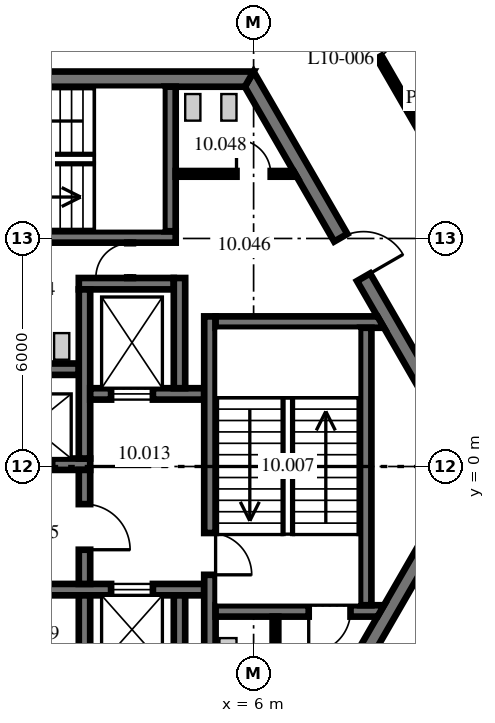
"""IFC4 building model, lengths in metres.
Left out: names, types, materials, properties, quantities, classifications, styles, units other than length and angle.
Written with IfcOpenShell. Run it as: python <this file> out.ifc"""

import sys

from ifc_helpers import new_model, si_unit, direction, frame, frame_2d, origin, place, context, subcontext, project, spatial, polyline, rectangle, outline, extrude, source, transform, mapped, element, fill, save


model = new_model("IFC4")
c1 = context("Model", 3, precision=1e-05, world=origin(), true_north=direction((0.0, 1.0)))
c2 = subcontext(c1, "Body", "Model", "MODEL_VIEW")
j1 = project(units=[si_unit("LENGTHUNIT", "METRE"), si_unit("PLANEANGLEUNIT", "RADIAN")], contexts=[c1])
p1 = place(None, origin())
s1 = spatial("IfcSite", under=j1, at=p1, CompositionType="ELEMENT")
p2 = place(p1, origin())
s2 = spatial("IfcBuilding", under=s1, at=p2, CompositionType="ELEMENT")
p3 = place(p2, frame((0.0, 0.0, 46.1)))
s3 = spatial("IfcBuildingStorey", under=s2, at=p3, CompositionType="ELEMENT", Elevation=46.1)
m1 = source(origin(), c2, "Body", "SweptSolid", [
    extrude(outline(polyline([(-0.115, -0.2), (11.885, -0.2), (11.654, 0.2), (0.115, 0.2), (-0.115, -0.2)])), origin(), (0.0, 0.0, 1.0), 4.1),
])
p4 = place(p3, frame((11.769, 0.0, 0.0), z_axis=(0.0, 0.0, 1.0), x_axis=(-0.499996592174, 0.866027371285, 0.0)))
e1 = element("IfcWall", 1, at=p4, inside=s3, PredefinedType="SHEAR", context=c2, shape_type="MappedRepresentation", body=[
    mapped(m1, transform((0.0, 0.0, 0.0), scale=1.0)),
])
p5 = place(p4, frame((5.75, 0.0, 0.0)))
e2 = element("IfcOpeningElement", 2, at=p5, cuts=e1, PredefinedType="OPENING", context=c2, shape_type="SweptSolid", body=[
    extrude(rectangle(XDim=1.2, YDim=2.1, at=frame_2d((0.6, 1.05))), frame((0.0, 0.21, 0.0), z_axis=(0.0, -1.0, 0.0), x_axis=(1.0, 0.0, 0.0)), (0.0, 0.0, 1.0), 0.42),
])
p6 = place(p3, frame((5.885, 10.192, 0.0), z_axis=(0.0, 0.0, 1.0), x_axis=(-1.0, 0.0, 0.0)))
e3 = element("IfcWall", 3, at=p6, inside=s3, PredefinedType="SHEAR", context=c2, shape_type="MappedRepresentation", body=[
    mapped(m1, transform((0.0, 0.0, 0.0), scale=1.0)),
])
p7 = place(p6, frame((7.985, 0.0, 0.0)))
e4 = element("IfcOpeningElement", 4, at=p7, cuts=e3, PredefinedType="OPENING", context=c2, shape_type="SweptSolid", body=[
    extrude(rectangle(XDim=1.2, YDim=2.1, at=frame_2d((0.6, 1.05))), frame((0.0, 0.21, 0.0), z_axis=(0.0, -1.0, 0.0), x_axis=(1.0, 0.0, 0.0)), (0.0, 0.0, 1.0), 0.42),
])
p8 = place(p3, frame((5.885, -10.192, 0.0), z_axis=(0.0, 0.0, 1.0), x_axis=(0.499996592174, 0.866027371285, 0.0)))
e5 = element("IfcWall", 5, at=p8, inside=s3, PredefinedType="SHEAR", context=c2, shape_type="MappedRepresentation", body=[
    mapped(m1, transform((0.0, 0.0, 0.0), scale=1.0)),
])
p9 = place(p8, frame((3.665, 0.0, 0.0)))
e6 = element("IfcOpeningElement", 6, at=p9, cuts=e5, PredefinedType="OPENING", context=c2, shape_type="SweptSolid", body=[
    extrude(rectangle(XDim=1.2, YDim=2.1, at=frame_2d((0.6, 1.05))), frame((0.0, 0.21, 0.0), z_axis=(0.0, -1.0, 0.0), x_axis=(1.0, 0.0, 0.0)), (0.0, 0.0, 1.0), 0.42),
])
m2 = source(origin(), c2, "Body", "SweptSolid", [
    extrude(rectangle(XDim=11.5, YDim=0.3, at=frame_2d((5.75, 0.0))), origin(), (0.0, 0.0, 1.0), 4.1),
])
p10 = place(p3, frame((-9.8, 0.06, 0.0), z_axis=(0.0, 0.0, 1.0), x_axis=(1.0, 0.0, 0.0)))
e7 = element("IfcWall", 7, at=p10, inside=s3, PredefinedType="SHEAR", context=c2, shape_type="MappedRepresentation", body=[
    mapped(m2, transform((0.0, 0.0, 0.0), scale=1.0)),
])
p11 = place(p10, frame((1.0, 0.0, 0.0)))
e8 = element("IfcOpeningElement", 8, at=p11, cuts=e7, PredefinedType="OPENING", context=c2, shape_type="SweptSolid", body=[
    extrude(rectangle(XDim=1.1, YDim=2.1, at=frame_2d((0.55, 1.05))), frame((0.0, 0.16, 0.0), z_axis=(0.0, -1.0, 0.0), x_axis=(1.0, 0.0, 0.0)), (0.0, 0.0, 1.0), 0.32),
])
p12 = place(p10, frame((3.8, 0.0, 0.0)))
e9 = element("IfcOpeningElement", 9, at=p12, cuts=e7, PredefinedType="OPENING", context=c2, shape_type="SweptSolid", body=[
    extrude(rectangle(XDim=1.1, YDim=2.1, at=frame_2d((0.55, 1.05))), frame((0.0, 0.16, 0.0), z_axis=(0.0, -1.0, 0.0), x_axis=(1.0, 0.0, 0.0)), (0.0, 0.0, 1.0), 0.32),
])
p13 = place(p10, frame((6.6, 0.0, 0.0)))
e10 = element("IfcOpeningElement", 10, at=p13, cuts=e7, PredefinedType="OPENING", context=c2, shape_type="SweptSolid", body=[
    extrude(rectangle(XDim=1.1, YDim=2.1, at=frame_2d((0.55, 1.05))), frame((0.0, 0.16, 0.0), z_axis=(0.0, -1.0, 0.0), x_axis=(1.0, 0.0, 0.0)), (0.0, 0.0, 1.0), 0.32),
])
p14 = place(p10, frame((9.4, 0.0, 0.0)))
e11 = element("IfcOpeningElement", 11, at=p14, cuts=e7, PredefinedType="OPENING", context=c2, shape_type="SweptSolid", body=[
    extrude(rectangle(XDim=1.1, YDim=2.1, at=frame_2d((0.55, 1.05))), frame((0.0, 0.16, 0.0), z_axis=(0.0, -1.0, 0.0), x_axis=(1.0, 0.0, 0.0)), (0.0, 0.0, 1.0), 0.32),
])
m3 = source(origin(), c2, "Body", "SweptSolid", [
    extrude(outline(polyline([(11.2, -0.15), (-0.349, -0.15), (-0.176, 0.15), (11.2, 0.15), (11.2, -0.15)])), origin(), (0.0, 0.0, 1.0), 4.1),
])
p15 = place(p3, frame((-9.8, 2.56, 0.0), z_axis=(0.0, 0.0, 1.0), x_axis=(1.0, 0.0, 0.0)))
e12 = element("IfcWall", 12, at=p15, inside=s3, PredefinedType="SHEAR", context=c2, shape_type="MappedRepresentation", body=[
    mapped(m3, transform((0.0, 0.0, 0.0), scale=1.0)),
])
m4 = source(origin(), c2, "Body", "SweptSolid", [
    extrude(rectangle(XDim=2.5, YDim=0.3, at=frame_2d((1.25, 0.0))), origin(), (0.0, 0.0, 1.0), 4.1),
])
p16 = place(p3, frame((1.4, 4.81, 0.0), z_axis=(0.0, 0.0, 1.0), x_axis=(1.0, 0.0, 0.0)))
e13 = element("IfcWall", 13, at=p16, inside=s3, PredefinedType="SHEAR", context=c2, shape_type="MappedRepresentation", body=[
    mapped(m4, transform((0.0, 0.0, 0.0), scale=1.0)),
])
m5 = source(origin(), c2, "Body", "SweptSolid", [
    extrude(rectangle(XDim=4.45, YDim=0.3, at=frame_2d((2.225, 0.0))), origin(), (0.0, 0.0, 1.0), 4.1),
])
p17 = place(p3, frame((1.55, 0.21, 0.0), z_axis=(0.0, 0.0, 1.0), x_axis=(0.0, 1.0, 0.0)))
e14 = element("IfcWall", 14, at=p17, inside=s3, PredefinedType="SHEAR", context=c2, shape_type="MappedRepresentation", body=[
    mapped(m5, transform((0.0, 0.0, 0.0), scale=1.0)),
])
m6 = source(origin(), c2, "Body", "SweptSolid", [
    extrude(rectangle(XDim=3.0, YDim=0.3, at=frame_2d((1.5, 0.0))), origin(), (0.0, 0.0, 1.0), 4.1),
])
p18 = place(p3, frame((1.7, 1.91, 0.0), z_axis=(0.0, 0.0, 1.0), x_axis=(1.0, 0.0, 0.0)))
e15 = element("IfcWall", 15, at=p18, inside=s3, PredefinedType="SHEAR", context=c2, shape_type="MappedRepresentation", body=[
    mapped(m6, transform((0.0, 0.0, 0.0), scale=1.0)),
])
p19 = place(p18, frame((0.55, 0.0, 0.0)))
e16 = element("IfcOpeningElement", 16, at=p19, cuts=e15, PredefinedType="OPENING", context=c2, shape_type="SweptSolid", body=[
    extrude(rectangle(XDim=1.1, YDim=2.1, at=frame_2d((0.55, 1.05))), frame((0.0, 0.16, 0.0), z_axis=(0.0, -1.0, 0.0), x_axis=(1.0, 0.0, 0.0)), (0.0, 0.0, 1.0), 0.32),
])
m7 = source(origin(), c2, "Body", "SweptSolid", [
    extrude(rectangle(XDim=2.9, YDim=0.3, at=frame_2d((1.45, 0.0))), origin(), (0.0, 0.0, 1.0), 4.1),
])
p20 = place(p3, frame((4.05, 2.06, 0.0), z_axis=(0.0, 0.0, 1.0), x_axis=(0.0, 1.0, 0.0)))
e17 = element("IfcWall", 17, at=p20, inside=s3, PredefinedType="SHEAR", context=c2, shape_type="MappedRepresentation", body=[
    mapped(m7, transform((0.0, 0.0, 0.0), scale=1.0)),
])
m8 = source(origin(), c2, "Body", "SweptSolid", [
    extrude(rectangle(XDim=12.8, YDim=0.3, at=frame_2d((6.4, 0.0))), origin(), (0.0, 0.0, 1.0), 4.1),
])
p21 = place(p3, frame((-8.1, -3.24, 0.0), z_axis=(0.0, 0.0, 1.0), x_axis=(1.0, 0.0, 0.0)))
e18 = element("IfcWall", 18, at=p21, inside=s3, PredefinedType="SHEAR", context=c2, shape_type="MappedRepresentation", body=[
    mapped(m8, transform((0.0, 0.0, 0.0), scale=1.0)),
])
p22 = place(p21, frame((1.113, 0.0, 0.0)))
e19 = element("IfcOpeningElement", 19, at=p22, cuts=e18, PredefinedType="OPENING", context=c2, shape_type="SweptSolid", body=[
    extrude(rectangle(XDim=0.9, YDim=2.1, at=frame_2d((0.45, 1.05))), frame((0.0, 0.16, 0.0), z_axis=(0.0, -1.0, 0.0), x_axis=(1.0, 0.0, 0.0)), (0.0, 0.0, 1.0), 0.32),
])
p23 = place(p21, frame((5.788, 0.0, 0.0)))
e20 = element("IfcOpeningElement", 20, at=p23, cuts=e18, PredefinedType="OPENING", context=c2, shape_type="SweptSolid", body=[
    extrude(rectangle(XDim=0.9, YDim=2.1, at=frame_2d((0.45, 1.05))), frame((0.0, 0.16, 0.0), z_axis=(0.0, -1.0, 0.0), x_axis=(1.0, 0.0, 0.0)), (0.0, 0.0, 1.0), 0.32),
])
p24 = place(p21, frame((10.35, 0.0, 0.0)))
e21 = element("IfcOpeningElement", 21, at=p24, cuts=e18, PredefinedType="OPENING", context=c2, shape_type="SweptSolid", body=[
    extrude(rectangle(XDim=1.1, YDim=2.1, at=frame_2d((0.55, 1.05))), frame((0.0, 0.16, 0.0), z_axis=(0.0, -1.0, 0.0), x_axis=(1.0, 0.0, 0.0)), (0.0, 0.0, 1.0), 0.32),
])
m9 = source(origin(), c2, "Body", "SweptSolid", [
    extrude(rectangle(XDim=2.2, YDim=0.3, at=frame_2d((1.1, 0.0))), origin(), (0.0, 0.0, 1.0), 4.1),
])
p25 = place(p3, frame((1.55, -5.59, 0.0), z_axis=(0.0, 0.0, 1.0), x_axis=(0.0, 1.0, 0.0)))
e22 = element("IfcWall", 22, at=p25, inside=s3, PredefinedType="SHEAR", context=c2, shape_type="MappedRepresentation", body=[
    mapped(m9, transform((0.0, 0.0, 0.0), scale=1.0)),
])
p26 = place(p3, frame((4.05, -5.89, 0.0), z_axis=(0.0, 0.0, 1.0), x_axis=(0.0, 1.0, 0.0)))
e23 = element("IfcWall", 23, at=p26, inside=s3, PredefinedType="SHEAR", context=c2, shape_type="MappedRepresentation", body=[
    mapped(m4, transform((0.0, 0.0, 0.0), scale=1.0)),
])
p27 = place(p3, frame((1.55, -3.09, 0.0), z_axis=(0.0, 0.0, 1.0), x_axis=(0.0, 1.0, 0.0)))
e24 = element("IfcWall", 24, at=p27, inside=s3, PredefinedType="SHEAR", context=c2, shape_type="MappedRepresentation", body=[
    mapped(m6, transform((0.0, 0.0, 0.0), scale=1.0)),
])
p28 = place(p27, frame((0.9, 0.0, 0.0)))
e25 = element("IfcOpeningElement", 25, at=p28, cuts=e24, PredefinedType="OPENING", context=c2, shape_type="SweptSolid", body=[
    extrude(rectangle(XDim=1.2, YDim=2.1, at=frame_2d((0.6, 1.05))), frame((0.0, 0.16, 0.0), z_axis=(0.0, -1.0, 0.0), x_axis=(1.0, 0.0, 0.0)), (0.0, 0.0, 1.0), 0.32),
])
m10 = source(origin(), c2, "Body", "SweptSolid", [
    extrude(outline(polyline([(-0.15, -0.15), (9.99, -0.15), (9.99, 0.15), (0.15, 0.15), (-0.15, -0.15)])), origin(), (0.0, 0.0, 1.0), 4.1),
])
p29 = place(p3, frame((4.85, -6.04, 0.0), z_axis=(0.0, 0.0, 1.0), x_axis=(0.0, 1.0, 0.0)))
e26 = element("IfcWall", 26, at=p29, inside=s3, PredefinedType="SHEAR", context=c2, shape_type="MappedRepresentation", body=[
    mapped(m10, transform((0.0, 0.0, 0.0), scale=1.0)),
])
p30 = place(p29, frame((3.19, 0.0, 0.0)))
e27 = element("IfcOpeningElement", 27, at=p30, cuts=e26, PredefinedType="OPENING", context=c2, shape_type="SweptSolid", body=[
    extrude(rectangle(XDim=1.1, YDim=2.1, at=frame_2d((0.55, 1.05))), frame((0.0, 0.16, 0.0), z_axis=(0.0, -1.0, 0.0), x_axis=(1.0, 0.0, 0.0)), (0.0, 0.0, 1.0), 0.32),
])
m11 = source(origin(), c2, "Body", "SweptSolid", [
    extrude(outline(polyline([(0.0, -0.15), (0.0, 0.15), (4.26, 0.15), (4.433, -0.15), (0.0, -0.15)])), origin(), (0.0, 0.0, 1.0), 4.1),
])
p31 = place(p3, frame((5.0, 3.8, 0.0), z_axis=(0.0, 0.0, 1.0), x_axis=(1.0, 0.0, 0.0)))
e28 = element("IfcWall", 28, at=p31, inside=s3, PredefinedType="SHEAR", context=c2, shape_type="MappedRepresentation", body=[
    mapped(m11, transform((0.0, 0.0, 0.0), scale=1.0)),
])
m12 = source(origin(), c2, "Body", "SweptSolid", [
    extrude(outline(polyline([(0.0, -0.15), (0.0, 0.15), (4.433, 0.15), (4.26, -0.15), (0.0, -0.15)])), origin(), (0.0, 0.0, 1.0), 4.1),
])
p32 = place(p3, frame((5.0, -3.8, 0.0), z_axis=(0.0, 0.0, 1.0), x_axis=(1.0, 0.0, 0.0)))
e29 = element("IfcWall", 29, at=p32, inside=s3, PredefinedType="SHEAR", context=c2, shape_type="MappedRepresentation", body=[
    mapped(m12, transform((0.0, 0.0, 0.0), scale=1.0)),
])
p33 = place(p32, frame((2.45, 0.0, 0.0)))
e30 = element("IfcOpeningElement", 30, at=p33, cuts=e29, PredefinedType="OPENING", context=c2, shape_type="SweptSolid", body=[
    extrude(rectangle(XDim=1.1, YDim=2.1, at=frame_2d((0.55, 1.05))), frame((0.0, 0.16, 0.0), z_axis=(0.0, -1.0, 0.0), x_axis=(1.0, 0.0, 0.0)), (0.0, 0.0, 1.0), 0.32),
])
m13 = source(origin(), c2, "Body", "SweptSolid", [
    extrude(rectangle(XDim=7.3, YDim=0.3, at=frame_2d((3.65, 0.0))), origin(), (0.0, 0.0, 1.0), 4.1),
])
p34 = place(p3, frame((8.95, -3.65, 0.0), z_axis=(0.0, 0.0, 1.0), x_axis=(0.0, 1.0, 0.0)))
e31 = element("IfcWall", 31, at=p34, inside=s3, PredefinedType="SHEAR", context=c2, shape_type="MappedRepresentation", body=[
    mapped(m13, transform((0.0, 0.0, 0.0), scale=1.0)),
])
m14 = source(origin(), c2, "Body", "SweptSolid", [
    extrude(rectangle(XDim=7.9, YDim=0.3, at=frame_2d((3.95, 0.0))), origin(), (0.0, 0.0, 1.0), 4.1),
])
p35 = place(p3, frame((-3.95, 6.04, 0.0), z_axis=(0.0, 0.0, 1.0), x_axis=(1.0, 0.0, 0.0)))
e32 = element("IfcWall", 32, at=p35, inside=s3, PredefinedType="SHEAR", context=c2, shape_type="MappedRepresentation", body=[
    mapped(m14, transform((0.0, 0.0, 0.0), scale=1.0)),
])
m15 = source(origin(), c2, "Body", "SweptSolid", [
    extrude(outline(polyline([(0.0, -0.15), (0.0, 0.15), (3.804, 0.15), (3.804, -0.15), (0.0, -0.15)])), origin(), (0.0, 0.0, 1.0), 4.1),
])
p36 = place(p3, frame((3.8, 6.19, 0.0), z_axis=(0.0, 0.0, 1.0), x_axis=(0.0, 1.0, 0.0)))
e33 = element("IfcWall", 33, at=p36, inside=s3, PredefinedType="SHEAR", context=c2, shape_type="MappedRepresentation", body=[
    mapped(m15, transform((0.0, 0.0, 0.0), scale=1.0)),
])
m16 = source(origin(), c2, "Body", "SweptSolid", [
    extrude(outline(polyline([(-0.075, -0.075), (4.05, -0.075), (4.05, 0.075), (0.075, 0.075), (-0.075, -0.075)])), origin(), (0.0, 0.0, 1.0), 4.1),
])
p37 = place(p3, frame((6.575, -8.0, 0.0), z_axis=(0.0, 0.0, 1.0), x_axis=(0.0, 1.0, 0.0)))
e34 = element("IfcWall", 34, at=p37, inside=s3, PredefinedType="PARTITIONING", context=c2, shape_type="MappedRepresentation", body=[
    mapped(m16, transform((0.0, 0.0, 0.0), scale=1.0)),
])
m17 = source(origin(), c2, "Body", "SweptSolid", [
    extrude(outline(polyline([(0.0, -0.075), (0.0, 0.075), (3.102, 0.075), (3.188, -0.075), (0.0, -0.075)])), origin(), (0.0, 0.0, 1.0), 4.1),
])
p38 = place(p3, frame((3.95, 7.7, 0.0), z_axis=(0.0, 0.0, 1.0), x_axis=(1.0, 0.0, 0.0)))
e35 = element("IfcWall", 35, at=p38, inside=s3, PredefinedType="PARTITIONING", context=c2, shape_type="MappedRepresentation", body=[
    mapped(m17, transform((0.0, 0.0, 0.0), scale=1.0)),
])
p39 = place(p38, frame((1.6, 0.0, 0.0)))
e36 = element("IfcOpeningElement", 36, at=p39, cuts=e35, PredefinedType="OPENING", context=c2, shape_type="SweptSolid", body=[
    extrude(rectangle(XDim=0.9, YDim=2.1, at=frame_2d((0.45, 1.05))), frame((0.0, 0.085, 0.0), z_axis=(0.0, -1.0, 0.0), x_axis=(1.0, 0.0, 0.0)), (0.0, 0.0, 1.0), 0.17),
])
m18 = source(origin(), c2, "Body", "SweptSolid", [
    extrude(rectangle(XDim=0.93, YDim=0.15, at=frame_2d((0.465, 0.0))), origin(), (0.0, 0.0, 1.0), 4.1),
])
p40 = place(p3, frame((2.75, 4.96, 0.0), z_axis=(0.0, 0.0, 1.0), x_axis=(0.0, 1.0, 0.0)))
e37 = element("IfcWall", 37, at=p40, inside=s3, PredefinedType="PARTITIONING", context=c2, shape_type="MappedRepresentation", body=[
    mapped(m18, transform((0.0, 0.0, 0.0), scale=1.0)),
])
p41 = place(p40, frame((0.015, 0.0, 0.0)))
e38 = element("IfcOpeningElement", 38, at=p41, cuts=e37, PredefinedType="OPENING", context=c2, shape_type="SweptSolid", body=[
    extrude(rectangle(XDim=0.9, YDim=2.1, at=frame_2d((0.45, 1.05))), frame((0.0, 0.085, 0.0), z_axis=(0.0, -1.0, 0.0), x_axis=(1.0, 0.0, 0.0)), (0.0, 0.0, 1.0), 0.17),
])
p42 = place(p3, frame((7.761, 13.442, 0.0), z_axis=(0.0, 0.0, 1.0), x_axis=(0.500005339912, -0.866022320763, 0.0)))
e39 = element("IfcWall", 39, at=p42, inside=s3, PredefinedType="PARTITIONING", context=c2, shape_type="SweptSolid", body=[
    extrude(rectangle(XDim=9.338, YDim=0.15, at=frame_2d((4.669, 0.0))), origin(), (0.0, 0.0, 1.0), 4.1),
])
p43 = place(p42, frame((2.183, 0.0, 0.0)))
e40 = element("IfcOpeningElement", 40, at=p43, cuts=e39, PredefinedType="OPENING", context=c2, shape_type="SweptSolid", body=[
    extrude(rectangle(XDim=0.9, YDim=2.1, at=frame_2d((0.45, 1.05))), frame((0.0, 0.085, 0.0), z_axis=(0.0, -1.0, 0.0), x_axis=(1.0, 0.0, 0.0)), (0.0, 0.0, 1.0), 0.17),
])
p44 = place(p5, frame((1.2, 0.0, 0.0), z_axis=(0.0, 0.0, 1.0), x_axis=(-1.0, 0.0, 0.0)))
e41 = element("IfcDoor", 41, at=p44, inside=s3, OperationType="SINGLE_SWING_RIGHT", PredefinedType="DOOR", context=c2, shape_type="SweptSolid", body=[
    extrude(rectangle(XDim=1.2, YDim=2.1, at=frame_2d((0.6, 1.05))), frame((0.0, 0.025, 0.0), z_axis=(0.0, -1.0, 0.0), x_axis=(1.0, 0.0, 0.0)), (0.0, 0.0, 1.0), 0.05),
])
fill(e2, e41)
p45 = place(p30, frame((1.1, 0.0, 0.0), z_axis=(0.0, 0.0, 1.0), x_axis=(-1.0, 0.0, 0.0)))
e42 = element("IfcDoor", 42, at=p45, inside=s3, OperationType="SINGLE_SWING_RIGHT", PredefinedType="DOOR", context=c2, shape_type="SweptSolid", body=[
    extrude(rectangle(XDim=1.1, YDim=2.1, at=frame_2d((0.55, 1.05))), frame((0.0, 0.025, 0.0), z_axis=(0.0, -1.0, 0.0), x_axis=(1.0, 0.0, 0.0)), (0.0, 0.0, 1.0), 0.05),
])
fill(e27, e42)
p46 = place(p33, frame((1.1, 0.0, 0.0), z_axis=(0.0, 0.0, 1.0), x_axis=(-1.0, 0.0, 0.0)))
e43 = element("IfcDoor", 43, at=p46, inside=s3, OperationType="SINGLE_SWING_RIGHT", PredefinedType="DOOR", context=c2, shape_type="SweptSolid", body=[
    extrude(rectangle(XDim=1.1, YDim=2.1, at=frame_2d((0.55, 1.05))), frame((0.0, 0.025, 0.0), z_axis=(0.0, -1.0, 0.0), x_axis=(1.0, 0.0, 0.0)), (0.0, 0.0, 1.0), 0.05),
])
fill(e30, e43)
p47 = place(p28, frame((1.2, 0.0, 0.0), z_axis=(0.0, 0.0, 1.0), x_axis=(-1.0, 0.0, 0.0)))
e44 = element("IfcDoor", 44, at=p47, inside=s3, OperationType="SINGLE_SWING_RIGHT", PredefinedType="DOOR", context=c2, shape_type="SweptSolid", body=[
    extrude(rectangle(XDim=1.2, YDim=2.1, at=frame_2d((0.6, 1.05))), frame((0.0, 0.025, 0.0), z_axis=(0.0, -1.0, 0.0), x_axis=(1.0, 0.0, 0.0)), (0.0, 0.0, 1.0), 0.05),
])
fill(e25, e44)
p48 = place(p41, origin())
e45 = element("IfcDoor", 45, at=p48, inside=s3, OperationType="SINGLE_SWING_LEFT", PredefinedType="DOOR", context=c2, shape_type="SweptSolid", body=[
    extrude(rectangle(XDim=0.9, YDim=2.1, at=frame_2d((0.45, 1.05))), frame((0.0, 0.025, 0.0), z_axis=(0.0, -1.0, 0.0), x_axis=(1.0, 0.0, 0.0)), (0.0, 0.0, 1.0), 0.05),
])
fill(e38, e45)
p49 = place(p39, origin())
e46 = element("IfcDoor", 46, at=p49, inside=s3, OperationType="SINGLE_SWING_LEFT", PredefinedType="DOOR", context=c2, shape_type="SweptSolid", body=[
    extrude(rectangle(XDim=0.9, YDim=2.1, at=frame_2d((0.45, 1.05))), frame((0.0, 0.025, 0.0), z_axis=(0.0, -1.0, 0.0), x_axis=(1.0, 0.0, 0.0)), (0.0, 0.0, 1.0), 0.05),
])
fill(e36, e46)
p50 = place(p19, origin())
e47 = element("IfcDoor", 47, at=p50, inside=s3, OperationType="DOUBLE_DOOR_SLIDING", PredefinedType="DOOR", context=c2, shape_type="SweptSolid", body=[
    extrude(rectangle(XDim=1.1, YDim=2.1, at=frame_2d((0.55, 1.05))), frame((0.0, 0.025, 0.0), z_axis=(0.0, -1.0, 0.0), x_axis=(1.0, 0.0, 0.0)), (0.0, 0.0, 1.0), 0.05),
])
fill(e16, e47)
p51 = place(p24, origin())
e48 = element("IfcDoor", 48, at=p51, inside=s3, OperationType="DOUBLE_DOOR_SLIDING", PredefinedType="DOOR", context=c2, shape_type="SweptSolid", body=[
    extrude(rectangle(XDim=1.1, YDim=2.1, at=frame_2d((0.55, 1.05))), frame((0.0, 0.025, 0.0), z_axis=(0.0, -1.0, 0.0), x_axis=(1.0, 0.0, 0.0)), (0.0, 0.0, 1.0), 0.05),
])
fill(e21, e48)
p52 = place(p43, origin())
e49 = element("IfcDoor", 49, at=p52, inside=s3, OperationType="SINGLE_SWING_LEFT", PredefinedType="DOOR", context=c2, shape_type="SweptSolid", body=[
    extrude(rectangle(XDim=0.9, YDim=2.1, at=frame_2d((0.45, 1.05))), frame((0.0, 0.025, 0.0), z_axis=(0.0, -1.0, 0.0), x_axis=(1.0, 0.0, 0.0)), (0.0, 0.0, 1.0), 0.05),
])
fill(e40, e49)
save(model, sys.argv[1])
